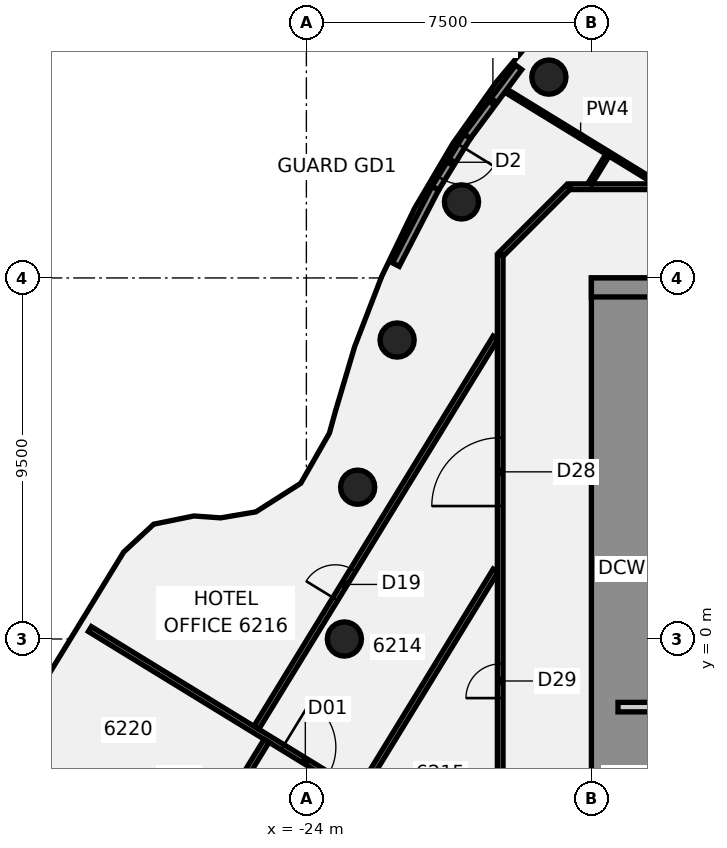
"""IFC4 building model, lengths in metres.
Left out: names, types, materials, properties, quantities, classifications, styles, units other than length and angle.
Written with IfcOpenShell. Run it as: python <this file> out.ifc"""

import sys

from ifc_helpers import new_model, si_unit, direction, frame, frame_2d, origin, origin_2d, place, context, subcontext, project, spatial, polyline, rectangle, circle, outline, extrude, element, fill, save


model = new_model("IFC4")
c1 = context("Model", 3, precision=1e-05, world=origin(), true_north=direction((0.0, 1.0)))
c2 = subcontext(c1, "Body", "Model", "MODEL_VIEW")
j1 = project(units=[si_unit("LENGTHUNIT", "METRE"), si_unit("PLANEANGLEUNIT", "RADIAN")], contexts=[c1])
p1 = place(None, origin())
s1 = spatial("IfcSite", under=j1, at=p1, CompositionType="ELEMENT")
p2 = place(p1, origin())
s2 = spatial("IfcBuilding", under=s1, at=p2, CompositionType="ELEMENT")
p3 = place(p2, frame((0.0, 0.0, 245.1)))
s3 = spatial("IfcBuildingStorey", under=s2, at=p3, CompositionType="ELEMENT", Elevation=245.1)
for number, where, z_axis, x_axis in (
    (1, (-17.619, 14.784, -0.14), (0.0, 0.0, 1.0), (1.0, 0.0, 0.0)),
    (2, (-19.919, 11.5, -0.14), (0.0, 0.0, 1.0), (1.0, 0.0, 0.0)),
    (3, (-21.613, 7.866, -0.14), (0.0, 0.0, 1.0), (1.0, 0.0, 0.0)),
    (4, (-22.651, 3.994, -0.14), (0.0, 0.0, 1.0), (1.0, 0.0, 0.0)),
    (5, (-23.0, 0.0, -0.14), (0.0, 0.0, 1.0), (1.0, 0.0, 0.0)),
):
    element("IfcColumn", number, at=place(p3, frame(where, z_axis=z_axis, x_axis=x_axis)), inside=s3, PredefinedType="COLUMN", context=c2, shape_type="SweptSolid", body=[
        extrude(circle(Radius=0.45, at=origin_2d()), origin(), (0.0, 0.0, 1.0), 3.6),
    ])
p4 = place(p3, frame((-29.696, 0.26, 0.0), z_axis=(0.0, 0.0, 1.0), x_axis=(0.852605760598, -0.522554702395, 0.0)))
e6 = element("IfcWall", 6, at=p4, inside=s3, PredefinedType="PARTITIONING", context=c2, shape_type="SweptSolid", body=[
    extrude(rectangle(XDim=7.783, YDim=0.15, at=frame_2d((3.892, 0.0))), origin(), (0.0, 0.0, 1.0), 2.864),
])
p5 = place(p4, frame((5.949, 0.0, 0.0)))
e7 = element("IfcOpeningElement", 7, at=p5, cuts=e6, PredefinedType="OPENING", context=c2, shape_type="SweptSolid", body=[
    extrude(rectangle(XDim=1.4, YDim=2.1, at=frame_2d((0.7, 1.05))), frame((0.0, 0.085, 0.0), z_axis=(0.0, -1.0, 0.0), x_axis=(1.0, 0.0, 0.0)), (0.0, 0.0, 1.0), 0.17),
])
p6 = place(p3, frame((-18.78, 14.446, 0.0), z_axis=(0.0, 0.0, 1.0), x_axis=(0.85278401902, -0.522263742667, 0.0)))
e8 = element("IfcWall", 8, at=p6, inside=s3, PredefinedType="PARTITIONING", context=c2, shape_type="SweptSolid", body=[
    extrude(rectangle(XDim=4.683, YDim=0.1, at=frame_2d((2.342, 0.0))), origin(), (0.0, 0.0, 1.0), 2.864),
])
p7 = place(p3, frame((-17.065, 11.9, 0.0), z_axis=(0.0, 0.0, 1.0), x_axis=(1.0, 0.0, 0.0)))
e9 = element("IfcWall", 9, at=p7, inside=s3, PredefinedType="PARTITIONING", context=c2, shape_type="SweptSolid", body=[
    extrude(rectangle(XDim=34.165, YDim=0.15, at=frame_2d((17.083, 0.0))), origin(), (0.0, 0.0, 1.0), 2.864),
])
p8 = place(p7, frame((25.046, 0.0, 0.0)))
e10 = element("IfcOpeningElement", 10, at=p8, cuts=e9, PredefinedType="OPENING", context=c2, shape_type="SweptSolid", body=[
    extrude(rectangle(XDim=1.8, YDim=2.1, at=frame_2d((0.9, 1.05))), frame((0.0, 0.085, 0.0), z_axis=(0.0, -1.0, 0.0), x_axis=(1.0, 0.0, 0.0)), (0.0, 0.0, 1.0), 0.17),
])
p9 = place(p7, frame((9.79, 0.0, 0.0)))
e11 = element("IfcOpeningElement", 11, at=p9, cuts=e9, PredefinedType="OPENING", context=c2, shape_type="SweptSolid", body=[
    extrude(rectangle(XDim=1.8, YDim=2.1, at=frame_2d((0.9, 1.05))), frame((0.0, 0.085, 0.0), z_axis=(0.0, -1.0, 0.0), x_axis=(1.0, 0.0, 0.0)), (0.0, 0.0, 1.0), 0.17),
])
p10 = place(p7, frame((2.59, 0.0, 0.0)))
e12 = element("IfcOpeningElement", 12, at=p10, cuts=e9, PredefinedType="OPENING", context=c2, shape_type="SweptSolid", body=[
    extrude(rectangle(XDim=1.8, YDim=2.1, at=frame_2d((0.9, 1.05))), frame((0.0, 0.085, 0.0), z_axis=(0.0, -1.0, 0.0), x_axis=(1.0, 0.0, 0.0)), (0.0, 0.0, 1.0), 0.17),
])
p11 = place(p3, frame((-18.872, 10.128, 0.0), z_axis=(0.0, 0.0, 1.0), x_axis=(0.707106781187, 0.707106781187, 0.0)))
e13 = element("IfcWall", 13, at=p11, inside=s3, PredefinedType="PARTITIONING", context=c2, shape_type="SweptSolid", body=[
    extrude(rectangle(XDim=2.505, YDim=0.15, at=frame_2d((1.253, 0.0))), origin(), (0.0, 0.0, 1.0), 2.864),
])
p12 = place(p3, frame((-25.315, -2.332, 0.0), z_axis=(0.0, 0.0, 1.0), x_axis=(0.522799283553, 0.852455810653, 0.0)))
e14 = element("IfcWall", 14, at=p12, inside=s3, PredefinedType="PARTITIONING", context=c2, shape_type="SweptSolid", body=[
    extrude(rectangle(XDim=12.041, YDim=0.15, at=frame_2d((6.021, 0.0))), origin(), (0.0, 0.0, 1.0), 2.864),
])
p13 = place(p12, frame((3.97, 0.0, 0.0)))
e15 = element("IfcOpeningElement", 15, at=p13, cuts=e14, PredefinedType="OPENING", context=c2, shape_type="SweptSolid", body=[
    extrude(rectangle(XDim=0.9, YDim=2.1, at=frame_2d((0.45, 1.05))), frame((0.0, 0.085, 0.0), z_axis=(0.0, -1.0, 0.0), x_axis=(1.0, 0.0, 0.0)), (0.0, 0.0, 1.0), 0.17),
])
p14 = place(p3, frame((-16.535, 11.985, 0.0), z_axis=(0.0, 0.0, 1.0), x_axis=(0.522633992849, 0.852557159092, 0.0)))
e16 = element("IfcWall", 16, at=p14, inside=s3, PredefinedType="PARTITIONING", context=c2, shape_type="SweptSolid", body=[
    extrude(rectangle(XDim=0.875, YDim=0.1, at=frame_2d((0.438, 0.0))), origin(), (0.0, 0.0, 1.0), 2.864),
])
p15 = place(p3, frame((-27.077, -5.99, 0.0), z_axis=(0.0, 0.0, 1.0), x_axis=(0.522393858558, 0.852704319528, 0.0)))
e17 = element("IfcWall", 17, at=p15, inside=s3, PredefinedType="PARTITIONING", context=c2, shape_type="SweptSolid", body=[
    extrude(rectangle(XDim=3.88, YDim=0.15, at=frame_2d((1.94, 0.0))), origin(), (0.0, 0.0, 1.0), 2.864),
])
p16 = place(p15, frame((1.05, 0.0, 0.0)))
e18 = element("IfcOpeningElement", 18, at=p16, cuts=e17, PredefinedType="OPENING", context=c2, shape_type="SweptSolid", body=[
    extrude(rectangle(XDim=0.9, YDim=2.1, at=frame_2d((0.45, 1.05))), frame((0.0, 0.085, 0.0), z_axis=(0.0, -1.0, 0.0), x_axis=(1.0, 0.0, 0.0)), (0.0, 0.0, 1.0), 0.17),
])
p17 = place(p3, frame((-22.362, -3.654, 0.0), z_axis=(0.0, 0.0, 1.0), x_axis=(0.522380406817, 0.852712560347, 0.0)))
e19 = element("IfcWall", 19, at=p17, inside=s3, PredefinedType="PARTITIONING", context=c2, shape_type="SweptSolid", body=[
    extrude(rectangle(XDim=6.398, YDim=0.15, at=frame_2d((3.199, 0.0))), origin(), (0.0, 0.0, 1.0), 2.864),
])
p18 = place(p3, frame((-18.9, -10.1, 0.0), z_axis=(0.0, 0.0, 1.0), x_axis=(0.0, 1.0, 0.0)))
e20 = element("IfcWall", 20, at=p18, inside=s3, PredefinedType="PARTITIONING", context=c2, shape_type="SweptSolid", body=[
    extrude(rectangle(XDim=20.2, YDim=0.15, at=frame_2d((10.1, 0.0))), origin(), (0.0, 0.0, 1.0), 2.864),
])
p19 = place(p18, frame((13.598, 0.0, 0.0)))
e21 = element("IfcOpeningElement", 21, at=p19, cuts=e20, PredefinedType="OPENING", context=c2, shape_type="SweptSolid", body=[
    extrude(rectangle(XDim=1.8, YDim=2.1, at=frame_2d((0.9, 1.05))), frame((0.0, 0.085, 0.0), z_axis=(0.0, -1.0, 0.0), x_axis=(1.0, 0.0, 0.0)), (0.0, 0.0, 1.0), 0.17),
])
p20 = place(p18, frame((8.545, 0.0, 0.0)))
e22 = element("IfcOpeningElement", 22, at=p20, cuts=e20, PredefinedType="OPENING", context=c2, shape_type="SweptSolid", body=[
    extrude(rectangle(XDim=0.9, YDim=2.1, at=frame_2d((0.45, 1.05))), frame((0.0, 0.085, 0.0), z_axis=(0.0, -1.0, 0.0), x_axis=(1.0, 0.0, 0.0)), (0.0, 0.0, 1.0), 0.17),
])
for number, where, z_axis, x_axis in (
    (23, (-18.416, 15.041, 0.0), (0.0, 0.0, 1.0), (-0.597, -0.802, 0.0)),
    (24, (-20.606, 11.863, 0.0), (0.0, 0.0, 1.0), (-0.459, -0.888, 0.0)),
):
    element("IfcWall", number, at=place(p3, frame(where, z_axis=z_axis, x_axis=x_axis)), inside=s3, PredefinedType="SOLIDWALL", context=c2, shape_type="SweptSolid", body=[
        extrude(rectangle(XDim=2.265, YDim=0.2, at=frame_2d((1.132, 0.0))), origin(), (0.0, 0.0, 1.0), 3.46),
    ])
p21 = place(p3, frame((-19.768, 13.225, 0.0), z_axis=(0.0, 0.0, 1.0), x_axis=(-0.524140017295, -0.851632105002, 0.0)))
e25 = element("IfcWall", 25, at=p21, inside=s3, PredefinedType="SOLIDWALL", context=c2, shape_type="SweptSolid", body=[
    extrude(rectangle(XDim=1.599, YDim=0.2, at=frame_2d((0.8, 0.0))), origin(), (0.0, 0.0, 1.0), 3.46),
])
p22 = place(p21, frame((0.3, 0.0, 0.0)))
e26 = element("IfcOpeningElement", 26, at=p22, cuts=e25, PredefinedType="OPENING", context=c2, shape_type="SweptSolid", body=[
    extrude(rectangle(XDim=1.0, YDim=2.4, at=frame_2d((0.5, 1.2))), frame((0.0, 0.11, 0.0), z_axis=(0.0, -1.0, 0.0), x_axis=(1.0, 0.0, 0.0)), (0.0, 0.0, 1.0), 0.22),
])
p23 = place(p3, origin())
e27 = element("IfcWall", 27, at=p23, inside=s3, PredefinedType="SHEAR", context=c2, shape_type="SweptSolid", body=[
    extrude(outline(polyline([(-13.5, -8.125), (-16.0, -8.125), (-16.0, -5.625), (-13.5, -5.625), (-13.5, -5.375), (-16.0, -5.375), (-16.0, 5.375), (-13.5, 5.375), (-13.5, 5.625), (-16.0, 5.625), (-16.0, 8.125), (-13.5, 8.125), (-13.5, 9.0), (-16.0, 9.0), (-16.5, 9.0), (-16.5, -9.0), (-16.0, -9.0), (-13.5, -9.0), (-13.5, -8.125)])), origin(), (0.0, 0.0, 1.0), 3.46),
])
p24 = place(p3, frame((-16.5, 9.25, 0.0), z_axis=(0.0, 0.0, 1.0), x_axis=(1.0, 0.0, 0.0)))
e28 = element("IfcWall", 28, at=p24, inside=s3, PredefinedType="SHEAR", context=c2, shape_type="SweptSolid", body=[
    extrude(rectangle(XDim=13.0, YDim=0.5, at=frame_2d((6.5, 0.0))), origin(), (0.0, 0.0, 1.0), 3.46),
])
p25 = place(p3, frame((-15.8, -1.792, 0.0), z_axis=(0.0, 0.0, 1.0), x_axis=(1.0, 0.0, 0.0)))
e29 = element("IfcWall", 29, at=p25, inside=s3, PredefinedType="PARTITIONING", context=c2, shape_type="SweptSolid", body=[
    extrude(rectangle(XDim=2.3, YDim=0.25, at=frame_2d((1.15, 0.0))), origin(), (0.0, 0.0, 1.0), 3.46),
])
p26 = place(p5, origin())
e30 = element("IfcDoor", 30, at=p26, inside=s3, OperationType="DOUBLE_DOOR_SINGLE_SWING", PredefinedType="DOOR", context=c2, shape_type="SweptSolid", body=[
    extrude(rectangle(XDim=1.4, YDim=2.1, at=frame_2d((0.7, 1.05))), frame((0.0, 0.025, 0.0), z_axis=(0.0, -1.0, 0.0), x_axis=(1.0, 0.0, 0.0)), (0.0, 0.0, 1.0), 0.05),
])
fill(e7, e30)
p27 = place(p13, origin())
e31 = element("IfcDoor", 31, at=p27, inside=s3, OperationType="SINGLE_SWING_RIGHT", PredefinedType="DOOR", context=c2, shape_type="SweptSolid", body=[
    extrude(rectangle(XDim=0.9, YDim=2.1, at=frame_2d((0.45, 1.05))), frame((0.0, 0.025, 0.0), z_axis=(0.0, -1.0, 0.0), x_axis=(1.0, 0.0, 0.0)), (0.0, 0.0, 1.0), 0.05),
])
fill(e15, e31)
p28 = place(p19, frame((1.8, 0.0, 0.0), z_axis=(0.0, 0.0, 1.0), x_axis=(-1.0, 0.0, 0.0)))
e32 = element("IfcDoor", 32, at=p28, inside=s3, OperationType="DOUBLE_DOOR_SINGLE_SWING", PredefinedType="DOOR", context=c2, shape_type="SweptSolid", body=[
    extrude(rectangle(XDim=1.8, YDim=2.1, at=frame_2d((0.9, 1.05))), frame((0.0, 0.025, 0.0), z_axis=(0.0, -1.0, 0.0), x_axis=(1.0, 0.0, 0.0)), (0.0, 0.0, 1.0), 0.05),
])
fill(e21, e32)
p29 = place(p20, origin())
e33 = element("IfcDoor", 33, at=p29, inside=s3, OperationType="SINGLE_SWING_RIGHT", PredefinedType="DOOR", context=c2, shape_type="SweptSolid", body=[
    extrude(rectangle(XDim=0.9, YDim=2.1, at=frame_2d((0.45, 1.05))), frame((0.0, 0.025, 0.0), z_axis=(0.0, -1.0, 0.0), x_axis=(1.0, 0.0, 0.0)), (0.0, 0.0, 1.0), 0.05),
])
fill(e22, e33)
p30 = place(p22, origin())
e34 = element("IfcDoor", 34, at=p30, inside=s3, OperationType="SINGLE_SWING_LEFT", PredefinedType="DOOR", context=c2, shape_type="SweptSolid", body=[
    extrude(rectangle(XDim=1.0, YDim=2.4, at=frame_2d((0.5, 1.2))), frame((0.0, 0.025, 0.0), z_axis=(0.0, -1.0, 0.0), x_axis=(1.0, 0.0, 0.0)), (0.0, 0.0, 1.0), 0.05),
])
fill(e26, e34)
save(model, sys.argv[1])
